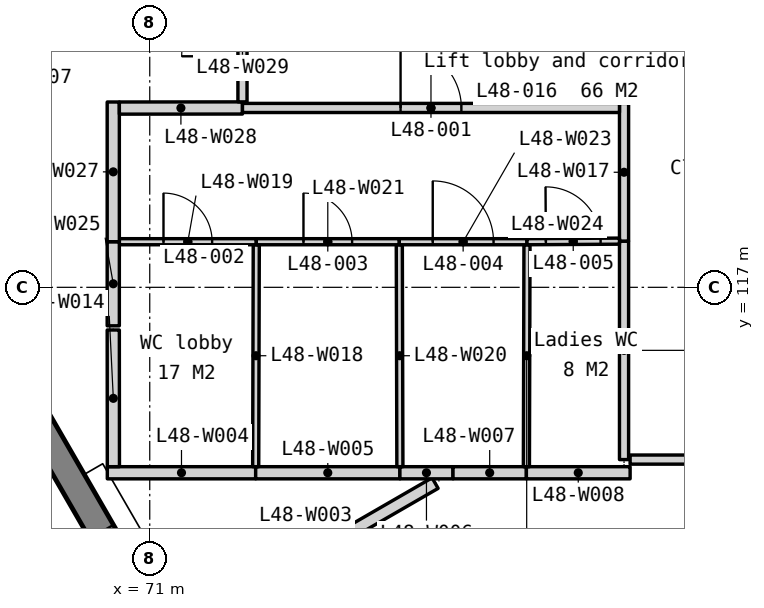
"""IFC4 building model, lengths in metres.
Left out: names, types, materials, properties, quantities, classifications, styles, units other than length and angle.
Written with IfcOpenShell. Run it as: python <this file> out.ifc"""

import sys

from ifc_helpers import new_model, si_unit, direction, frame, frame_2d, origin, place, context, subcontext, project, spatial, polyline, rectangle, outline, extrude, element, fill, save


model = new_model("IFC4")
c1 = context("Model", 3, precision=1e-05, world=origin(), true_north=direction((0.0, 1.0)))
c2 = subcontext(c1, "Body", "Model", "MODEL_VIEW")
j1 = project(units=[si_unit("LENGTHUNIT", "METRE"), si_unit("PLANEANGLEUNIT", "RADIAN")], contexts=[c1])
p1 = place(None, origin())
s1 = spatial("IfcSite", under=j1, at=p1, CompositionType="ELEMENT")
p2 = place(p1, origin())
s2 = spatial("IfcBuilding", under=s1, at=p2, CompositionType="ELEMENT")
p3 = place(p2, frame((0.0, 0.0, 191.9)))
s3 = spatial("IfcBuildingStorey", under=s2, at=p3, CompositionType="ELEMENT", Elevation=191.9)
p4 = place(p3, frame((59.13, 132.168, -0.15), z_axis=(0.0, 0.0, 1.0), x_axis=(0.500002199942, -0.866024133644, 0.0)))
e1 = element("IfcWall", 1, at=p4, inside=s3, PredefinedType="SOLIDWALL", context=c2, shape_type="SweptSolid", body=[
    extrude(outline(polyline([(38.729, 0.0), (38.729, 3.9), (0.0, 3.9), (0.0, 0.0), (38.729, 0.0)])), frame((0.0, 0.225, 0.0), z_axis=(0.0, -1.0, 0.0), x_axis=(1.0, 0.0, 0.0)), (0.0, 0.0, 1.0), 0.45),
])
p5 = place(p4, frame((2.791, 0.0, 0.95)))
e2 = element("IfcOpeningElement", 2, at=p5, cuts=e1, PredefinedType="OPENING", context=c2, shape_type="SweptSolid", body=[
    extrude(rectangle(XDim=1.8, YDim=2.2, at=frame_2d((0.9, 1.1))), frame((0.0, 0.235, 0.0), z_axis=(0.0, -1.0, 0.0), x_axis=(1.0, 0.0, 0.0)), (0.0, 0.0, 1.0), 0.47),
])
p6 = place(p4, frame((5.091, 0.0, 0.95)))
e3 = element("IfcOpeningElement", 3, at=p6, cuts=e1, PredefinedType="OPENING", context=c2, shape_type="SweptSolid", body=[
    extrude(rectangle(XDim=1.8, YDim=2.2, at=frame_2d((0.9, 1.1))), frame((0.0, 0.235, 0.0), z_axis=(0.0, -1.0, 0.0), x_axis=(1.0, 0.0, 0.0)), (0.0, 0.0, 1.0), 0.47),
])
p7 = place(p4, frame((12.473, 0.0, 0.95)))
e4 = element("IfcOpeningElement", 4, at=p7, cuts=e1, PredefinedType="OPENING", context=c2, shape_type="SweptSolid", body=[
    extrude(rectangle(XDim=1.8, YDim=2.2, at=frame_2d((0.9, 1.1))), frame((0.0, 0.235, 0.0), z_axis=(0.0, -1.0, 0.0), x_axis=(1.0, 0.0, 0.0)), (0.0, 0.0, 1.0), 0.47),
])
p8 = place(p4, frame((14.773, 0.0, 0.95)))
e5 = element("IfcOpeningElement", 5, at=p8, cuts=e1, PredefinedType="OPENING", context=c2, shape_type="SweptSolid", body=[
    extrude(rectangle(XDim=1.8, YDim=2.2, at=frame_2d((0.9, 1.1))), frame((0.0, 0.235, 0.0), z_axis=(0.0, -1.0, 0.0), x_axis=(1.0, 0.0, 0.0)), (0.0, 0.0, 1.0), 0.47),
])
p9 = place(p4, frame((22.156, 0.0, 0.95)))
e6 = element("IfcOpeningElement", 6, at=p9, cuts=e1, PredefinedType="OPENING", context=c2, shape_type="SweptSolid", body=[
    extrude(rectangle(XDim=1.8, YDim=2.2, at=frame_2d((0.9, 1.1))), frame((0.0, 0.235, 0.0), z_axis=(0.0, -1.0, 0.0), x_axis=(1.0, 0.0, 0.0)), (0.0, 0.0, 1.0), 0.47),
])
p10 = place(p4, frame((24.456, 0.0, 0.95)))
e7 = element("IfcOpeningElement", 7, at=p10, cuts=e1, PredefinedType="OPENING", context=c2, shape_type="SweptSolid", body=[
    extrude(rectangle(XDim=1.8, YDim=2.2, at=frame_2d((0.9, 1.1))), frame((0.0, 0.235, 0.0), z_axis=(0.0, -1.0, 0.0), x_axis=(1.0, 0.0, 0.0)), (0.0, 0.0, 1.0), 0.47),
])
p11 = place(p4, frame((31.838, 0.0, 0.95)))
e8 = element("IfcOpeningElement", 8, at=p11, cuts=e1, PredefinedType="OPENING", context=c2, shape_type="SweptSolid", body=[
    extrude(rectangle(XDim=1.8, YDim=2.2, at=frame_2d((0.9, 1.1))), frame((0.0, 0.235, 0.0), z_axis=(0.0, -1.0, 0.0), x_axis=(1.0, 0.0, 0.0)), (0.0, 0.0, 1.0), 0.47),
])
p12 = place(p4, frame((34.138, 0.0, 0.95)))
e9 = element("IfcOpeningElement", 9, at=p12, cuts=e1, PredefinedType="OPENING", context=c2, shape_type="SweptSolid", body=[
    extrude(rectangle(XDim=1.8, YDim=2.2, at=frame_2d((0.9, 1.1))), frame((0.0, 0.235, 0.0), z_axis=(0.0, -1.0, 0.0), x_axis=(1.0, 0.0, 0.0)), (0.0, 0.0, 1.0), 0.47),
])
p13 = place(p3, frame((71.428, 111.318, 0.0), z_axis=(0.0, 0.0, 1.0), x_axis=(0.86601964755, 0.500009969958, 0.0)))
e10 = element("IfcWall", 10, at=p13, inside=s3, PredefinedType="PARTITIONING", context=c2, shape_type="SweptSolid", body=[
    extrude(rectangle(XDim=4.925, YDim=0.2, at=frame_2d((2.462, 0.0))), origin(), (0.0, 0.0, 1.0), 3.75),
])
p14 = place(p3, frame((70.302, 113.95, 0.0), z_axis=(0.0, 0.0, 1.0), x_axis=(1.0, 0.0, 0.0)))
e11 = element("IfcWall", 11, at=p14, inside=s3, PredefinedType="PARTITIONING", context=c2, shape_type="SweptSolid", body=[
    extrude(rectangle(XDim=2.44, YDim=0.2, at=frame_2d((1.22, 0.0))), origin(), (0.0, 0.0, 1.0), 3.75),
])
p15 = place(p3, frame((72.742, 113.95, 0.0), z_axis=(0.0, 0.0, 1.0), x_axis=(1.0, 0.0, 0.0)))
e12 = element("IfcWall", 12, at=p15, inside=s3, PredefinedType="PARTITIONING", context=c2, shape_type="SweptSolid", body=[
    extrude(rectangle(XDim=2.372, YDim=0.2, at=frame_2d((1.186, 0.0))), origin(), (0.0, 0.0, 1.0), 3.75),
])
p16 = place(p3, frame((75.114, 113.95, 0.0), z_axis=(0.0, 0.0, 1.0), x_axis=(1.0, 0.0, 0.0)))
e13 = element("IfcWall", 13, at=p16, inside=s3, PredefinedType="PARTITIONING", context=c2, shape_type="SweptSolid", body=[
    extrude(rectangle(XDim=0.873, YDim=0.2, at=frame_2d((0.437, 0.0))), origin(), (0.0, 0.0, 1.0), 3.75),
])
p17 = place(p3, frame((75.987, 113.95, 0.0), z_axis=(0.0, 0.0, 1.0), x_axis=(1.0, 0.0, 0.0)))
e14 = element("IfcWall", 14, at=p17, inside=s3, PredefinedType="PARTITIONING", context=c2, shape_type="SweptSolid", body=[
    extrude(rectangle(XDim=1.207, YDim=0.2, at=frame_2d((0.604, 0.0))), origin(), (0.0, 0.0, 1.0), 3.75),
])
p18 = place(p3, frame((77.194, 113.95, 0.0), z_axis=(0.0, 0.0, 1.0), x_axis=(1.0, 0.0, 0.0)))
e15 = element("IfcWall", 15, at=p18, inside=s3, PredefinedType="PARTITIONING", context=c2, shape_type="SweptSolid", body=[
    extrude(rectangle(XDim=1.706, YDim=0.2, at=frame_2d((0.853, 0.0))), origin(), (0.0, 0.0, 1.0), 3.75),
])
p19 = place(p3, frame((78.9, 114.167, 0.0), z_axis=(0.0, 0.0, 1.0), x_axis=(1.0, 0.0, 0.0)))
e16 = element("IfcWall", 16, at=p19, inside=s3, PredefinedType="PARTITIONING", context=c2, shape_type="SweptSolid", body=[
    extrude(rectangle(XDim=4.737, YDim=0.15, at=frame_2d((2.369, 0.0))), origin(), (0.0, 0.0, 1.0), 3.75),
])
p20 = place(p19, frame((1.469, 0.0, 0.0)))
e17 = element("IfcOpeningElement", 17, at=p20, cuts=e16, PredefinedType="OPENING", context=c2, shape_type="SweptSolid", body=[
    extrude(rectangle(XDim=1.8, YDim=2.1, at=frame_2d((0.9, 1.05))), frame((0.0, 0.085, 0.0), z_axis=(0.0, -1.0, 0.0), x_axis=(1.0, 0.0, 0.0)), (0.0, 0.0, 1.0), 0.17),
])
p21 = place(p3, frame((78.8, 114.167, 0.0), z_axis=(0.0, 0.0, 1.0), x_axis=(0.0, 1.0, 0.0)))
e18 = element("IfcWall", 18, at=p21, inside=s3, PredefinedType="PARTITIONING", context=c2, shape_type="SweptSolid", body=[
    extrude(rectangle(XDim=3.593, YDim=0.15, at=frame_2d((1.797, 0.0))), origin(), (0.0, 0.0, 1.0), 3.75),
])
p22 = place(p3, frame((70.402, 114.05, 0.0), z_axis=(0.0, 0.0, 1.0), x_axis=(-0.000868809403, 0.999999622585, 0.0)))
e19 = element("IfcWall", 19, at=p22, inside=s3, PredefinedType="PARTITIONING", context=c2, shape_type="SweptSolid", body=[
    extrude(rectangle(XDim=2.248, YDim=0.2, at=frame_2d((1.124, 0.0))), origin(), (0.0, 0.0, 1.0), 3.75),
])
p23 = place(p3, frame((78.8, 117.76, 0.0), z_axis=(0.0, 0.0, 1.0), x_axis=(0.0, 1.0, 0.0)))
e20 = element("IfcWall", 20, at=p23, inside=s3, PredefinedType="PARTITIONING", context=c2, shape_type="SweptSolid", body=[
    extrude(rectangle(XDim=2.265, YDim=0.15, at=frame_2d((1.132, 0.0))), origin(), (0.0, 0.0, 1.0), 3.75),
])
p24 = place(p3, frame((72.742, 114.05, 0.0), z_axis=(0.0, 0.0, 1.0), x_axis=(0.002675575707, 0.999996420641, 0.0)))
e21 = element("IfcWall", 21, at=p24, inside=s3, PredefinedType="PARTITIONING", context=c2, shape_type="SweptSolid", body=[
    extrude(rectangle(XDim=3.65, YDim=0.1, at=frame_2d((1.825, 0.0))), origin(), (0.0, 0.0, 1.0), 3.75),
])
p25 = place(p3, frame((70.5, 117.75, 0.0), z_axis=(0.0, 0.0, 1.0), x_axis=(1.0, 0.0, 0.0)))
e22 = element("IfcWall", 22, at=p25, inside=s3, PredefinedType="PARTITIONING", context=c2, shape_type="SweptSolid", body=[
    extrude(rectangle(XDim=2.252, YDim=0.1, at=frame_2d((1.126, 0.0))), origin(), (0.0, 0.0, 1.0), 3.75),
])
p26 = place(p25, frame((0.726, 0.0, 0.0)))
e23 = element("IfcOpeningElement", 23, at=p26, cuts=e22, PredefinedType="OPENING", context=c2, shape_type="SweptSolid", body=[
    extrude(rectangle(XDim=0.8, YDim=2.1, at=frame_2d((0.4, 1.05))), frame((0.0, 0.06, 0.0), z_axis=(0.0, -1.0, 0.0), x_axis=(1.0, 0.0, 0.0)), (0.0, 0.0, 1.0), 0.12),
])
p27 = place(p3, frame((75.114, 114.05, 0.0), z_axis=(0.0, 0.0, 1.0), x_axis=(-0.002608686776, 0.999996597371, 0.0)))
e24 = element("IfcWall", 24, at=p27, inside=s3, PredefinedType="PARTITIONING", context=c2, shape_type="SweptSolid", body=[
    extrude(rectangle(XDim=3.65, YDim=0.1, at=frame_2d((1.825, 0.0))), origin(), (0.0, 0.0, 1.0), 3.75),
])
p28 = place(p3, frame((72.752, 117.75, 0.0), z_axis=(0.0, 0.0, 1.0), x_axis=(1.0, 0.0, 0.0)))
e25 = element("IfcWall", 25, at=p28, inside=s3, PredefinedType="PARTITIONING", context=c2, shape_type="SweptSolid", body=[
    extrude(rectangle(XDim=2.352, YDim=0.1, at=frame_2d((1.176, 0.0))), origin(), (0.0, 0.0, 1.0), 3.75),
])
p29 = place(p28, frame((0.776, 0.0, 0.0)))
e26 = element("IfcOpeningElement", 26, at=p29, cuts=e25, PredefinedType="OPENING", context=c2, shape_type="SweptSolid", body=[
    extrude(rectangle(XDim=0.8, YDim=2.1, at=frame_2d((0.4, 1.05))), frame((0.0, 0.06, 0.0), z_axis=(0.0, -1.0, 0.0), x_axis=(1.0, 0.0, 0.0)), (0.0, 0.0, 1.0), 0.12),
])
p30 = place(p3, frame((77.194, 114.05, 0.0), z_axis=(0.0, 0.0, 1.0), x_axis=(0.002608686776, 0.999996597371, 0.0)))
e27 = element("IfcWall", 27, at=p30, inside=s3, PredefinedType="PARTITIONING", context=c2, shape_type="SweptSolid", body=[
    extrude(rectangle(XDim=3.65, YDim=0.1, at=frame_2d((1.825, 0.0))), origin(), (0.0, 0.0, 1.0), 3.75),
])
p31 = place(p3, frame((75.104, 117.75, 0.0), z_axis=(0.0, 0.0, 1.0), x_axis=(1.0, 0.0, 0.0)))
e28 = element("IfcWall", 28, at=p31, inside=s3, PredefinedType="PARTITIONING", context=c2, shape_type="SweptSolid", body=[
    extrude(rectangle(XDim=2.1, YDim=0.1, at=frame_2d((1.05, 0.0))), origin(), (0.0, 0.0, 1.0), 3.75),
])
p32 = place(p31, frame((0.55, 0.0, 0.0)))
e29 = element("IfcOpeningElement", 29, at=p32, cuts=e28, PredefinedType="OPENING", context=c2, shape_type="SweptSolid", body=[
    extrude(rectangle(XDim=1.0, YDim=2.1, at=frame_2d((0.5, 1.05))), frame((0.0, 0.06, 0.0), z_axis=(0.0, -1.0, 0.0), x_axis=(1.0, 0.0, 0.0)), (0.0, 0.0, 1.0), 0.12),
])
p33 = place(p3, frame((77.204, 117.75, 0.0), z_axis=(0.0, 0.0, 1.0), x_axis=(0.999980406575, 0.006259909447, 0.0)))
e30 = element("IfcWall", 30, at=p33, inside=s3, PredefinedType="PARTITIONING", context=c2, shape_type="SweptSolid", body=[
    extrude(rectangle(XDim=1.521, YDim=0.1, at=frame_2d((0.76, 0.0))), origin(), (0.0, 0.0, 1.0), 3.75),
])
p34 = place(p33, frame((0.311, 0.0, 0.0)))
e31 = element("IfcOpeningElement", 31, at=p34, cuts=e30, PredefinedType="OPENING", context=c2, shape_type="SweptSolid", body=[
    extrude(rectangle(XDim=0.9, YDim=2.1, at=frame_2d((0.45, 1.05))), frame((0.0, 0.06, 0.0), z_axis=(0.0, -1.0, 0.0), x_axis=(1.0, 0.0, 0.0)), (0.0, 0.0, 1.0), 0.12),
])
p35 = place(p3, frame((70.4, 116.367, 0.0), z_axis=(0.0, 0.0, 1.0), x_axis=(0.0, 1.0, 0.0)))
e32 = element("IfcWall", 32, at=p35, inside=s3, PredefinedType="PARTITIONING", context=c2, shape_type="SweptSolid", body=[
    extrude(rectangle(XDim=1.383, YDim=0.2, at=frame_2d((0.692, 0.0))), origin(), (0.0, 0.0, 1.0), 3.75),
])
p36 = place(p3, frame((66.587, 119.703, 0.0), z_axis=(0.0, 0.0, 1.0), x_axis=(0.866023511746, 0.500003277092, 0.0)))
e33 = element("IfcWall", 33, at=p36, inside=s3, PredefinedType="PARTITIONING", context=c2, shape_type="SweptSolid", body=[
    extrude(rectangle(XDim=5.694, YDim=0.1, at=frame_2d((2.847, 0.0))), origin(), (0.0, 0.0, 1.0), 3.75),
])
p37 = place(p36, frame((2.397, 0.0, 0.0)))
e34 = element("IfcOpeningElement", 34, at=p37, cuts=e33, PredefinedType="OPENING", context=c2, shape_type="SweptSolid", body=[
    extrude(rectangle(XDim=0.9, YDim=2.1, at=frame_2d((0.45, 1.05))), frame((0.0, 0.06, 0.0), z_axis=(0.0, -1.0, 0.0), x_axis=(1.0, 0.0, 0.0)), (0.0, 0.0, 1.0), 0.12),
])
p38 = place(p3, frame((70.4, 117.75, 0.0), z_axis=(0.0, 0.0, 1.0), x_axis=(0.0, 1.0, 0.0)))
e35 = element("IfcWall", 35, at=p38, inside=s3, PredefinedType="PARTITIONING", context=c2, shape_type="SweptSolid", body=[
    extrude(rectangle(XDim=2.298, YDim=0.2, at=frame_2d((1.149, 0.0))), origin(), (0.0, 0.0, 1.0), 3.75),
])
p39 = place(p3, frame((70.5, 119.948, 0.0), z_axis=(0.0, 0.0, 1.0), x_axis=(0.999999534819, 0.00096455224, 0.0)))
e36 = element("IfcWall", 36, at=p39, inside=s3, PredefinedType="PARTITIONING", context=c2, shape_type="SweptSolid", body=[
    extrude(rectangle(XDim=2.025, YDim=0.2, at=frame_2d((1.012, 0.0))), origin(), (0.0, 0.0, 1.0), 3.75),
])
p40 = place(p3, frame((72.525, 120.05, 0.0), z_axis=(0.0, 0.0, 1.0), x_axis=(0.0, 1.0, 0.0)))
e37 = element("IfcWall", 37, at=p40, inside=s3, PredefinedType="PARTITIONING", context=c2, shape_type="SweptSolid", body=[
    extrude(rectangle(XDim=2.5, YDim=0.15, at=frame_2d((1.25, 0.0))), origin(), (0.0, 0.0, 1.0), 3.75),
])
p41 = place(p40, frame((0.75, 0.0, 0.0)))
e38 = element("IfcOpeningElement", 38, at=p41, cuts=e37, PredefinedType="OPENING", context=c2, shape_type="SweptSolid", body=[
    extrude(rectangle(XDim=1.0, YDim=2.1, at=frame_2d((0.5, 1.05))), frame((0.0, 0.085, 0.0), z_axis=(0.0, -1.0, 0.0), x_axis=(1.0, 0.0, 0.0)), (0.0, 0.0, 1.0), 0.17),
])
p42 = place(p3, frame((72.525, 119.95, 0.0), z_axis=(0.0, 0.0, 1.0), x_axis=(1.0, 0.0, 0.0)))
e39 = element("IfcWall", 39, at=p42, inside=s3, PredefinedType="PARTITIONING", context=c2, shape_type="SweptSolid", body=[
    extrude(rectangle(XDim=6.2, YDim=0.15, at=frame_2d((3.1, 0.0))), origin(), (0.0, 0.0, 1.0), 3.75),
])
p43 = place(p42, frame((2.6, 0.0, 0.0)))
e40 = element("IfcOpeningElement", 40, at=p43, cuts=e39, PredefinedType="OPENING", context=c2, shape_type="SweptSolid", body=[
    extrude(rectangle(XDim=1.0, YDim=2.1, at=frame_2d((0.5, 1.05))), frame((0.0, 0.085, 0.0), z_axis=(0.0, -1.0, 0.0), x_axis=(1.0, 0.0, 0.0)), (0.0, 0.0, 1.0), 0.17),
])
p44 = place(p43, origin())
e41 = element("IfcDoor", 41, at=p44, inside=s3, OperationType="SINGLE_SWING_LEFT", PredefinedType="DOOR", context=c2, shape_type="SweptSolid", body=[
    extrude(rectangle(XDim=1.0, YDim=2.1, at=frame_2d((0.5, 1.05))), frame((0.0, 0.025, 0.0), z_axis=(0.0, -1.0, 0.0), x_axis=(1.0, 0.0, 0.0)), (0.0, 0.0, 1.0), 0.05),
])
fill(e40, e41)
p45 = place(p26, origin())
e42 = element("IfcDoor", 42, at=p45, inside=s3, OperationType="SINGLE_SWING_LEFT", PredefinedType="DOOR", context=c2, shape_type="SweptSolid", body=[
    extrude(rectangle(XDim=0.8, YDim=2.1, at=frame_2d((0.4, 1.05))), frame((0.0, 0.025, 0.0), z_axis=(0.0, -1.0, 0.0), x_axis=(1.0, 0.0, 0.0)), (0.0, 0.0, 1.0), 0.05),
])
fill(e23, e42)
p46 = place(p29, origin())
e43 = element("IfcDoor", 43, at=p46, inside=s3, OperationType="SINGLE_SWING_LEFT", PredefinedType="DOOR", context=c2, shape_type="SweptSolid", body=[
    extrude(rectangle(XDim=0.8, YDim=2.1, at=frame_2d((0.4, 1.05))), frame((0.0, 0.025, 0.0), z_axis=(0.0, -1.0, 0.0), x_axis=(1.0, 0.0, 0.0)), (0.0, 0.0, 1.0), 0.05),
])
fill(e26, e43)
p47 = place(p32, origin())
e44 = element("IfcDoor", 44, at=p47, inside=s3, OperationType="SINGLE_SWING_LEFT", PredefinedType="DOOR", context=c2, shape_type="SweptSolid", body=[
    extrude(rectangle(XDim=1.0, YDim=2.1, at=frame_2d((0.5, 1.05))), frame((0.0, 0.025, 0.0), z_axis=(0.0, -1.0, 0.0), x_axis=(1.0, 0.0, 0.0)), (0.0, 0.0, 1.0), 0.05),
])
fill(e29, e44)
p48 = place(p34, origin())
e45 = element("IfcDoor", 45, at=p48, inside=s3, OperationType="SINGLE_SWING_LEFT", PredefinedType="DOOR", context=c2, shape_type="SweptSolid", body=[
    extrude(rectangle(XDim=0.9, YDim=2.1, at=frame_2d((0.45, 1.05))), frame((0.0, 0.025, 0.0), z_axis=(0.0, -1.0, 0.0), x_axis=(1.0, 0.0, 0.0)), (0.0, 0.0, 1.0), 0.05),
])
fill(e31, e45)
p49 = place(p41, origin())
e46 = element("IfcDoor", 46, at=p49, inside=s3, OperationType="SINGLE_SWING_LEFT", PredefinedType="DOOR", context=c2, shape_type="SweptSolid", body=[
    extrude(rectangle(XDim=1.0, YDim=2.1, at=frame_2d((0.5, 1.05))), frame((0.0, 0.025, 0.0), z_axis=(0.0, -1.0, 0.0), x_axis=(1.0, 0.0, 0.0)), (0.0, 0.0, 1.0), 0.05),
])
fill(e38, e46)
save(model, sys.argv[1])
